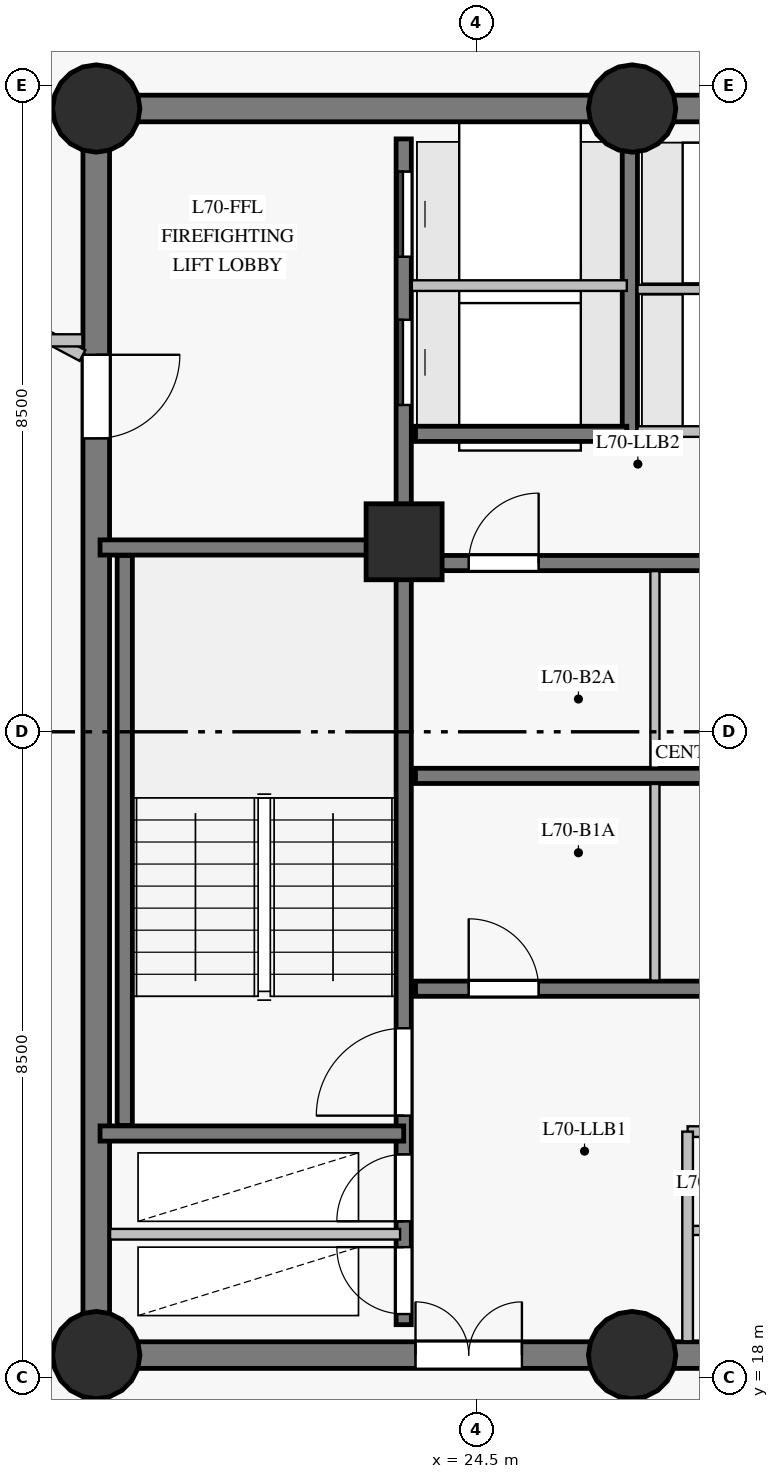
"""IFC4 building model, lengths in metres.
Left out: names, types, materials, properties, quantities, classifications, styles, units other than length and angle.
Written with IfcOpenShell. Run it as: python <this file> out.ifc"""

import sys

from ifc_helpers import new_model, si_unit, direction, frame, frame_2d, origin, origin_with_axes, origin_2d, place, context, subcontext, project, spatial, rectangle, circle, extrude, source, transform, mapped, element, fill, save


model = new_model("IFC4")
c1 = context("Model", 3, precision=1e-05, world=origin(), true_north=direction((0.0, 1.0)))
c2 = subcontext(c1, "Body", "Model", "MODEL_VIEW")
j1 = project(units=[si_unit("LENGTHUNIT", "METRE"), si_unit("PLANEANGLEUNIT", "RADIAN")], contexts=[c1])
p1 = place(None, origin())
s1 = spatial("IfcSite", under=j1, at=p1, CompositionType="ELEMENT")
p2 = place(p1, origin())
s2 = spatial("IfcBuilding", under=s1, at=p2, CompositionType="ELEMENT")
p3 = place(p2, frame((0.0, 0.0, 238.25)))
s3 = spatial("IfcBuildingStorey", under=s2, at=p3, CompositionType="ELEMENT", Elevation=238.25)
p4 = place(p3, frame((19.5, 18.3, 0.0), z_axis=(0.0, 0.0, 1.0), x_axis=(1.0, 0.0, 0.0)))
e1 = element("IfcWall", 1, at=p4, inside=s3, PredefinedType="SHEAR", context=c2, shape_type="SweptSolid", body=[
    extrude(rectangle(XDim=7.05, YDim=0.35, at=frame_2d((3.525, 0.0))), origin(), (0.0, 0.0, 1.0), 2.85),
])
p5 = place(p4, frame((4.2, 0.0, 0.0)))
e2 = element("IfcOpeningElement", 2, at=p5, cuts=e1, PredefinedType="OPENING", context=c2, shape_type="SweptSolid", body=[
    extrude(rectangle(XDim=1.4, YDim=2.2, at=frame_2d((0.7, 1.1))), frame((0.0, 0.185, 0.0), z_axis=(0.0, -1.0, 0.0), x_axis=(1.0, 0.0, 0.0)), (0.0, 0.0, 1.0), 0.37),
])
p6 = place(p3, frame((26.55, 18.3, 0.0), z_axis=(0.0, 0.0, 1.0), x_axis=(1.0, 0.0, 0.0)))
e3 = element("IfcWall", 3, at=p6, inside=s3, PredefinedType="SHEAR", context=c2, shape_type="SweptSolid", body=[
    extrude(rectangle(XDim=10.95, YDim=0.35, at=frame_2d((5.475, 0.0))), origin(), (0.0, 0.0, 1.0), 2.85),
])
p7 = place(p6, frame((4.55, 0.0, 0.0)))
e4 = element("IfcOpeningElement", 4, at=p7, cuts=e3, PredefinedType="OPENING", context=c2, shape_type="SweptSolid", body=[
    extrude(rectangle(XDim=1.4, YDim=2.2, at=frame_2d((0.7, 1.1))), frame((0.0, 0.185, 0.0), z_axis=(0.0, -1.0, 0.0), x_axis=(1.0, 0.0, 0.0)), (0.0, 0.0, 1.0), 0.37),
])
p8 = place(p3, frame((37.5, 34.7, 0.0), z_axis=(0.0, 0.0, 1.0), x_axis=(-1.0, 0.0, 0.0)))
e5 = element("IfcWall", 5, at=p8, inside=s3, PredefinedType="SHEAR", context=c2, shape_type="SweptSolid", body=[
    extrude(rectangle(XDim=10.95, YDim=0.35, at=frame_2d((5.475, 0.0))), origin(), (0.0, 0.0, 1.0), 2.85),
])
p9 = place(p8, frame((2.15, 0.0, 0.0)))
e6 = element("IfcOpeningElement", 6, at=p9, cuts=e5, PredefinedType="OPENING", context=c2, shape_type="SweptSolid", body=[
    extrude(rectangle(XDim=1.2, YDim=2.15, at=frame_2d((0.6, 1.075))), frame((0.0, 0.185, 0.0), z_axis=(0.0, -1.0, 0.0), x_axis=(1.0, 0.0, 0.0)), (0.0, 0.0, 1.0), 0.37),
])
p10 = place(p8, frame((6.35, 0.0, 0.0)))
e7 = element("IfcOpeningElement", 7, at=p10, cuts=e5, PredefinedType="OPENING", context=c2, shape_type="SweptSolid", body=[
    extrude(rectangle(XDim=1.1, YDim=2.15, at=frame_2d((0.55, 1.075))), frame((0.0, 0.185, 0.0), z_axis=(0.0, -1.0, 0.0), x_axis=(1.0, 0.0, 0.0)), (0.0, 0.0, 1.0), 0.37),
])
p11 = place(p3, frame((26.55, 34.7, 0.0), z_axis=(0.0, 0.0, 1.0), x_axis=(-1.0, 0.0, 0.0)))
e8 = element("IfcWall", 8, at=p11, inside=s3, PredefinedType="SHEAR", context=c2, shape_type="SweptSolid", body=[
    extrude(rectangle(XDim=7.05, YDim=0.35, at=frame_2d((3.525, 0.0))), origin(), (0.0, 0.0, 1.0), 2.85),
])
p12 = place(p3, frame((19.5, 34.7, 0.0), z_axis=(0.0, 0.0, 1.0), x_axis=(0.0, -1.0, 0.0)))
e9 = element("IfcWall", 9, at=p12, inside=s3, PredefinedType="SHEAR", context=c2, shape_type="SweptSolid", body=[
    extrude(rectangle(XDim=16.4, YDim=0.35, at=frame_2d((8.2, 0.0))), origin(), (0.0, 0.0, 1.0), 2.85),
])
p13 = place(p12, frame((3.24, 0.0, 0.0)))
e10 = element("IfcOpeningElement", 10, at=p13, cuts=e9, PredefinedType="OPENING", context=c2, shape_type="SweptSolid", body=[
    extrude(rectangle(XDim=1.1, YDim=2.15, at=frame_2d((0.55, 1.075))), frame((0.0, 0.185, 0.0), z_axis=(0.0, -1.0, 0.0), x_axis=(1.0, 0.0, 0.0)), (0.0, 0.0, 1.0), 0.37),
])
m1 = source(origin_with_axes(), c2, "Body", "SweptSolid", [
    extrude(circle(Radius=0.575, at=origin_2d()), origin(), (0.0, 0.0, 1.0), 3.05),
])
for number, where, z_axis, x_axis in (
    (11, (19.5, 18.3, 0.0), (0.0, 0.0, 1.0), (1.0, 0.0, 0.0)),
    (12, (26.55, 18.3, 0.0), (0.0, 0.0, 1.0), (1.0, 0.0, 0.0)),
    (13, (19.5, 34.7, 0.0), (0.0, 0.0, 1.0), (1.0, 0.0, 0.0)),
    (14, (26.55, 34.7, 0.0), (0.0, 0.0, 1.0), (1.0, 0.0, 0.0)),
):
    element("IfcColumn", number, at=place(p3, frame(where, z_axis=z_axis, x_axis=x_axis)), inside=s3, PredefinedType="COLUMN", context=c2, shape_type="MappedRepresentation", body=[
        mapped(m1, transform((0.0, 0.0, 0.0), scale=1.0)),
    ])
m2 = source(origin_with_axes(), c2, "Body", "SweptSolid", [
    extrude(rectangle(XDim=1.0, YDim=1.0, at=origin_2d()), origin(), (0.0, 0.0, 1.0), 3.05),
])
p14 = place(p3, frame((23.55, 29.0, 0.0), z_axis=(0.0, 0.0, 1.0), x_axis=(1.0, 0.0, 0.0)))
e15 = element("IfcColumn", 15, at=p14, inside=s3, PredefinedType="COLUMN", context=c2, shape_type="MappedRepresentation", body=[
    mapped(m2, transform((0.0, 0.0, 0.0), scale=1.0)),
])
p15 = place(p3, frame((23.545, 18.7, 0.0), z_axis=(0.0, 0.0, 1.0), x_axis=(0.0, 1.0, 0.0)))
e16 = element("IfcWall", 16, at=p15, inside=s3, PredefinedType="SHEAR", context=c2, shape_type="SweptSolid", body=[
    extrude(rectangle(XDim=15.6, YDim=0.2, at=frame_2d((7.8, 0.0))), origin(), (0.0, 0.0, 1.0), 2.85),
])
p16 = place(p15, frame((2.75, 0.0, 0.0)))
e17 = element("IfcOpeningElement", 17, at=p16, cuts=e16, PredefinedType="OPENING", context=c2, shape_type="SweptSolid", body=[
    extrude(rectangle(XDim=1.15, YDim=2.15, at=frame_2d((0.575, 1.075))), frame((0.0, 0.11, 0.0), z_axis=(0.0, -1.0, 0.0), x_axis=(1.0, 0.0, 0.0)), (0.0, 0.0, 1.0), 0.22),
])
p17 = place(p15, frame((0.14, 0.0, 0.0)))
e18 = element("IfcOpeningElement", 18, at=p17, cuts=e16, PredefinedType="OPENING", context=c2, shape_type="SweptSolid", body=[
    extrude(rectangle(XDim=0.88, YDim=2.1, at=frame_2d((0.44, 1.05))), frame((0.0, 0.11, 0.0), z_axis=(0.0, -1.0, 0.0), x_axis=(1.0, 0.0, 0.0)), (0.0, 0.0, 1.0), 0.22),
])
p18 = place(p15, frame((1.36, 0.0, 0.0)))
e19 = element("IfcOpeningElement", 19, at=p18, cuts=e16, PredefinedType="OPENING", context=c2, shape_type="SweptSolid", body=[
    extrude(rectangle(XDim=0.88, YDim=2.1, at=frame_2d((0.44, 1.05))), frame((0.0, 0.11, 0.0), z_axis=(0.0, -1.0, 0.0), x_axis=(1.0, 0.0, 0.0)), (0.0, 0.0, 1.0), 0.22),
])
p19 = place(p15, frame((12.1, 0.0, 0.0)))
e20 = element("IfcOpeningElement", 20, at=p19, cuts=e16, PredefinedType="OPENING", context=c2, shape_type="SweptSolid", body=[
    extrude(rectangle(XDim=1.12, YDim=2.15, at=frame_2d((0.56, 1.075))), frame((0.0, 0.11, 0.0), z_axis=(0.0, -1.0, 0.0), x_axis=(1.0, 0.0, 0.0)), (0.0, 0.0, 1.0), 0.22),
])
p20 = place(p15, frame((14.05, 0.0, 0.0)))
e21 = element("IfcOpeningElement", 21, at=p20, cuts=e16, PredefinedType="OPENING", context=c2, shape_type="SweptSolid", body=[
    extrude(rectangle(XDim=1.12, YDim=2.15, at=frame_2d((0.56, 1.075))), frame((0.0, 0.11, 0.0), z_axis=(0.0, -1.0, 0.0), x_axis=(1.0, 0.0, 0.0)), (0.0, 0.0, 1.0), 0.22),
])
p21 = place(p3, frame((23.7, 23.12, 0.0), z_axis=(0.0, 0.0, 1.0), x_axis=(1.0, 0.0, 0.0)))
e22 = element("IfcWall", 22, at=p21, inside=s3, PredefinedType="SHEAR", context=c2, shape_type="SweptSolid", body=[
    extrude(rectangle(XDim=9.6, YDim=0.2, at=frame_2d((4.8, 0.0))), origin(), (0.0, 0.0, 1.0), 2.85),
])
p22 = place(p21, frame((0.7, 0.0, 0.0)))
e23 = element("IfcOpeningElement", 23, at=p22, cuts=e22, PredefinedType="OPENING", context=c2, shape_type="SweptSolid", body=[
    extrude(rectangle(XDim=0.92, YDim=2.1, at=frame_2d((0.46, 1.05))), frame((0.0, 0.11, 0.0), z_axis=(0.0, -1.0, 0.0), x_axis=(1.0, 0.0, 0.0)), (0.0, 0.0, 1.0), 0.22),
])
p23 = place(p21, frame((4.2, 0.0, 0.0)))
e24 = element("IfcOpeningElement", 24, at=p23, cuts=e22, PredefinedType="OPENING", context=c2, shape_type="SweptSolid", body=[
    extrude(rectangle(XDim=0.92, YDim=2.1, at=frame_2d((0.46, 1.05))), frame((0.0, 0.11, 0.0), z_axis=(0.0, -1.0, 0.0), x_axis=(1.0, 0.0, 0.0)), (0.0, 0.0, 1.0), 0.22),
])
p24 = place(p21, frame((7.45, 0.0, 0.0)))
e25 = element("IfcOpeningElement", 25, at=p24, cuts=e22, PredefinedType="OPENING", context=c2, shape_type="SweptSolid", body=[
    extrude(rectangle(XDim=0.92, YDim=2.1, at=frame_2d((0.46, 1.05))), frame((0.0, 0.11, 0.0), z_axis=(0.0, -1.0, 0.0), x_axis=(1.0, 0.0, 0.0)), (0.0, 0.0, 1.0), 0.22),
])
p25 = place(p3, frame((23.7, 25.92, 0.0), z_axis=(0.0, 0.0, 1.0), x_axis=(1.0, 0.0, 0.0)))
e26 = element("IfcWall", 26, at=p25, inside=s3, PredefinedType="SHEAR", context=c2, shape_type="SweptSolid", body=[
    extrude(rectangle(XDim=9.6, YDim=0.2, at=frame_2d((4.8, 0.0))), origin(), (0.0, 0.0, 1.0), 2.85),
])
p26 = place(p3, frame((23.7, 28.72, 0.0), z_axis=(0.0, 0.0, 1.0), x_axis=(1.0, 0.0, 0.0)))
e27 = element("IfcWall", 27, at=p26, inside=s3, PredefinedType="SHEAR", context=c2, shape_type="SweptSolid", body=[
    extrude(rectangle(XDim=9.6, YDim=0.2, at=frame_2d((4.8, 0.0))), origin(), (0.0, 0.0, 1.0), 2.85),
])
p27 = place(p26, frame((0.7, 0.0, 0.0)))
e28 = element("IfcOpeningElement", 28, at=p27, cuts=e27, PredefinedType="OPENING", context=c2, shape_type="SweptSolid", body=[
    extrude(rectangle(XDim=0.92, YDim=2.1, at=frame_2d((0.46, 1.05))), frame((0.0, 0.11, 0.0), z_axis=(0.0, -1.0, 0.0), x_axis=(1.0, 0.0, 0.0)), (0.0, 0.0, 1.0), 0.22),
])
p28 = place(p26, frame((4.2, 0.0, 0.0)))
e29 = element("IfcOpeningElement", 29, at=p28, cuts=e27, PredefinedType="OPENING", context=c2, shape_type="SweptSolid", body=[
    extrude(rectangle(XDim=0.92, YDim=2.1, at=frame_2d((0.46, 1.05))), frame((0.0, 0.11, 0.0), z_axis=(0.0, -1.0, 0.0), x_axis=(1.0, 0.0, 0.0)), (0.0, 0.0, 1.0), 0.22),
])
p29 = place(p26, frame((7.45, 0.0, 0.0)))
e30 = element("IfcOpeningElement", 30, at=p29, cuts=e27, PredefinedType="OPENING", context=c2, shape_type="SweptSolid", body=[
    extrude(rectangle(XDim=0.92, YDim=2.1, at=frame_2d((0.46, 1.05))), frame((0.0, 0.11, 0.0), z_axis=(0.0, -1.0, 0.0), x_axis=(1.0, 0.0, 0.0)), (0.0, 0.0, 1.0), 0.22),
])
p30 = place(p3, frame((19.875, 21.32, 0.0), z_axis=(0.0, 0.0, 1.0), x_axis=(0.0, 1.0, 0.0)))
e31 = element("IfcWall", 31, at=p30, inside=s3, PredefinedType="SHEAR", context=c2, shape_type="SweptSolid", body=[
    extrude(rectangle(XDim=7.5, YDim=0.2, at=frame_2d((3.75, 0.0))), origin(), (0.0, 0.0, 1.0), 2.85),
])
for number, where, z_axis, x_axis in (
    (32, (19.55, 21.215, 0.0), (0.0, 0.0, 1.0), (1.0, 0.0, 0.0)),
    (33, (19.55, 28.925, 0.0), (0.0, 0.0, 1.0), (1.0, 0.0, 0.0)),
):
    element("IfcWall", number, at=place(p3, frame(where, z_axis=z_axis, x_axis=x_axis)), inside=s3, PredefinedType="SHEAR", context=c2, shape_type="SweptSolid", body=[
        extrude(rectangle(XDim=3.995, YDim=0.2, at=frame_2d((1.998, 0.0))), origin(), (0.0, 0.0, 1.0), 2.85),
    ])
p31 = place(p3, frame((26.52, 30.42, 0.0), z_axis=(0.0, 0.0, 1.0), x_axis=(0.0, 1.0, 0.0)))
e34 = element("IfcWall", 34, at=p31, inside=s3, PredefinedType="SHEAR", context=c2, shape_type="SweptSolid", body=[
    extrude(rectangle(XDim=3.86, YDim=0.2, at=frame_2d((1.93, 0.0))), origin(), (0.0, 0.0, 1.0), 2.85),
])
p32 = place(p3, frame((23.7, 30.42, 0.0), z_axis=(0.0, 0.0, 1.0), x_axis=(1.0, 0.0, 0.0)))
e35 = element("IfcWall", 35, at=p32, inside=s3, PredefinedType="SHEAR", context=c2, shape_type="SweptSolid", body=[
    extrude(rectangle(XDim=2.78, YDim=0.2, at=frame_2d((1.39, 0.0))), origin(), (0.0, 0.0, 1.0), 2.85),
])
p33 = place(p3, frame((19.319, 31.45, 0.0), z_axis=(0.0, 0.0, 1.0), x_axis=(-0.882947778203, 0.469471214203, 0.0)))
e36 = element("IfcWall", 36, at=p33, inside=s3, PredefinedType="PARTITIONING", context=c2, shape_type="SweptSolid", body=[
    extrude(rectangle(XDim=9.226, YDim=0.16, at=frame_2d((4.613, 0.0))), origin(), (0.0, 0.0, 1.0), 2.85),
])
p34 = place(p3, frame((19.682, 19.89, 0.0), z_axis=(0.0, 0.0, 1.0), x_axis=(1.0, 0.0, 0.0)))
e37 = element("IfcWall", 37, at=p34, inside=s3, PredefinedType="PARTITIONING", context=c2, shape_type="SweptSolid", body=[
    extrude(rectangle(XDim=3.815, YDim=0.14, at=frame_2d((1.908, 0.0))), origin(), (0.0, 0.0, 1.0), 2.85),
])
p35 = place(p3, frame((27.28, 21.24, 0.0), z_axis=(0.0, 0.0, 1.0), x_axis=(1.0, 0.0, 0.0)))
e38 = element("IfcWall", 38, at=p35, inside=s3, PredefinedType="PARTITIONING", context=c2, shape_type="SweptSolid", body=[
    extrude(rectangle(XDim=3.44, YDim=0.14, at=frame_2d((1.72, 0.0))), origin(), (0.0, 0.0, 1.0), 2.85),
])
p36 = place(p35, frame((1.15, 0.0, 0.0)))
e39 = element("IfcOpeningElement", 39, at=p36, cuts=e38, PredefinedType="OPENING", context=c2, shape_type="SweptSolid", body=[
    extrude(rectangle(XDim=0.92, YDim=2.1, at=frame_2d((0.46, 1.05))), frame((0.0, 0.08, 0.0), z_axis=(0.0, -1.0, 0.0), x_axis=(1.0, 0.0, 0.0)), (0.0, 0.0, 1.0), 0.16),
])
p37 = place(p3, frame((27.28, 19.94, 0.0), z_axis=(0.0, 0.0, 1.0), x_axis=(1.0, 0.0, 0.0)))
e40 = element("IfcWall", 40, at=p37, inside=s3, PredefinedType="PARTITIONING", context=c2, shape_type="SweptSolid", body=[
    extrude(rectangle(XDim=3.44, YDim=0.12, at=frame_2d((1.72, 0.0))), origin(), (0.0, 0.0, 1.0), 2.85),
])
p38 = place(p3, frame((23.652, 32.37, 0.0), z_axis=(0.0, 0.0, 1.0), x_axis=(1.0, 0.0, 0.0)))
e41 = element("IfcWall", 41, at=p38, inside=s3, PredefinedType="PARTITIONING", context=c2, shape_type="SweptSolid", body=[
    extrude(rectangle(XDim=2.828, YDim=0.14, at=frame_2d((1.414, 0.0))), origin(), (0.0, 0.0, 1.0), 2.85),
])
p39 = place(p3, frame((27.28, 18.482, 0.0), z_axis=(0.0, 0.0, 1.0), x_axis=(0.0, 1.0, 0.0)))
e42 = element("IfcWall", 42, at=p39, inside=s3, PredefinedType="PARTITIONING", context=c2, shape_type="SweptSolid", body=[
    extrude(rectangle(XDim=2.758, YDim=0.14, at=frame_2d((1.379, 0.0))), origin(), (0.0, 0.0, 1.0), 2.85),
])
p40 = place(p3, frame((26.62, 30.45, 0.0), z_axis=(0.0, 0.0, 1.0), x_axis=(1.0, 0.0, 0.0)))
e43 = element("IfcWall", 43, at=p40, inside=s3, PredefinedType="PARTITIONING", context=c2, shape_type="SweptSolid", body=[
    extrude(rectangle(XDim=2.58, YDim=0.14, at=frame_2d((1.29, 0.0))), origin(), (0.0, 0.0, 1.0), 2.85),
])
p41 = place(p3, frame((26.62, 32.32, 0.0), z_axis=(0.0, 0.0, 1.0), x_axis=(1.0, 0.0, 0.0)))
e44 = element("IfcWall", 44, at=p41, inside=s3, PredefinedType="PARTITIONING", context=c2, shape_type="SweptSolid", body=[
    extrude(rectangle(XDim=2.58, YDim=0.12, at=frame_2d((1.29, 0.0))), origin(), (0.0, 0.0, 1.0), 2.85),
])
p42 = place(p3, frame((16.75, 31.65, 0.0), z_axis=(0.0, 0.0, 1.0), x_axis=(1.0, 0.0, 0.0)))
e45 = element("IfcWall", 45, at=p42, inside=s3, PredefinedType="PARTITIONING", context=c2, shape_type="SweptSolid", body=[
    extrude(rectangle(XDim=2.568, YDim=0.16, at=frame_2d((1.284, 0.0))), origin(), (0.0, 0.0, 1.0), 2.85),
])
for number, where, z_axis, x_axis in (
    (46, (26.85, 23.227, 0.0), (0.0, 0.0, 1.0), (0.0, 1.0, 0.0)),
    (47, (26.85, 26.027, 0.0), (0.0, 0.0, 1.0), (0.0, 1.0, 0.0)),
):
    element("IfcWall", number, at=place(p3, frame(where, z_axis=z_axis, x_axis=x_axis)), inside=s3, PredefinedType="PARTITIONING", context=c2, shape_type="SweptSolid", body=[
        extrude(rectangle(XDim=2.587, YDim=0.12, at=frame_2d((1.293, 0.0))), origin(), (0.0, 0.0, 1.0), 2.85),
    ])
m3 = source(origin_with_axes(), c2, "Body", "SweptSolid", [
    extrude(rectangle(XDim=1.15, YDim=2.15, at=frame_2d((0.575, 1.075))), frame((0.0, 0.025, 0.0), z_axis=(0.0, -1.0, 0.0), x_axis=(1.0, 0.0, 0.0)), (0.0, 0.0, 1.0), 0.05),
])
p43 = place(p16, origin())
e48 = element("IfcDoor", 48, at=p43, inside=s3, OperationType="SINGLE_SWING_LEFT", PredefinedType="DOOR", context=c2, shape_type="MappedRepresentation", body=[
    mapped(m3, transform((0.0, 0.0, 0.0), scale=1.0)),
])
fill(e17, e48)
m4 = source(origin_with_axes(), c2, "Body", "SweptSolid", [
    extrude(rectangle(XDim=1.1, YDim=2.15, at=frame_2d((0.55, 1.075))), frame((0.0, 0.025, 0.0), z_axis=(0.0, -1.0, 0.0), x_axis=(1.0, 0.0, 0.0)), (0.0, 0.0, 1.0), 0.05),
])
p44 = place(p13, origin())
e49 = element("IfcDoor", 49, at=p44, inside=s3, OperationType="SINGLE_SWING_LEFT", PredefinedType="DOOR", context=c2, shape_type="MappedRepresentation", body=[
    mapped(m4, transform((0.0, 0.0, 0.0), scale=1.0)),
])
fill(e10, e49)
m5 = source(origin_with_axes(), c2, "Body", "SweptSolid", [
    extrude(rectangle(XDim=0.88, YDim=2.1, at=frame_2d((0.44, 1.05))), frame((0.0, 0.025, 0.0), z_axis=(0.0, -1.0, 0.0), x_axis=(1.0, 0.0, 0.0)), (0.0, 0.0, 1.0), 0.05),
])
p45 = place(p17, origin())
e50 = element("IfcDoor", 50, at=p45, inside=s3, OperationType="SINGLE_SWING_RIGHT", PredefinedType="DOOR", context=c2, shape_type="MappedRepresentation", body=[
    mapped(m5, transform((0.0, 0.0, 0.0), scale=1.0)),
])
fill(e18, e50)
p46 = place(p18, origin())
e51 = element("IfcDoor", 51, at=p46, inside=s3, OperationType="SINGLE_SWING_LEFT", PredefinedType="DOOR", context=c2, shape_type="MappedRepresentation", body=[
    mapped(m5, transform((0.0, 0.0, 0.0), scale=1.0)),
])
fill(e19, e51)
m6 = source(origin_with_axes(), c2, "Body", "SweptSolid", [
    extrude(rectangle(XDim=1.4, YDim=2.2, at=frame_2d((0.7, 1.1))), frame((0.0, 0.025, 0.0), z_axis=(0.0, -1.0, 0.0), x_axis=(1.0, 0.0, 0.0)), (0.0, 0.0, 1.0), 0.05),
])
p47 = place(p5, origin())
e52 = element("IfcDoor", 52, at=p47, inside=s3, OperationType="DOUBLE_DOOR_SINGLE_SWING", PredefinedType="DOOR", context=c2, shape_type="MappedRepresentation", body=[
    mapped(m6, transform((0.0, 0.0, 0.0), scale=1.0)),
])
fill(e2, e52)
m7 = source(origin_with_axes(), c2, "Body", "SweptSolid", [
    extrude(rectangle(XDim=0.92, YDim=2.1, at=frame_2d((0.46, 1.05))), frame((0.0, 0.025, 0.0), z_axis=(0.0, -1.0, 0.0), x_axis=(1.0, 0.0, 0.0)), (0.0, 0.0, 1.0), 0.05),
])
p48 = place(p22, origin())
e53 = element("IfcDoor", 53, at=p48, inside=s3, OperationType="SINGLE_SWING_LEFT", PredefinedType="DOOR", context=c2, shape_type="MappedRepresentation", body=[
    mapped(m7, transform((0.0, 0.0, 0.0), scale=1.0)),
])
fill(e23, e53)
p49 = place(p27, origin())
e54 = element("IfcDoor", 54, at=p49, inside=s3, OperationType="SINGLE_SWING_RIGHT", PredefinedType="DOOR", context=c2, shape_type="MappedRepresentation", body=[
    mapped(m7, transform((0.0, 0.0, 0.0), scale=1.0)),
])
fill(e28, e54)
m8 = source(origin_with_axes(), c2, "Body", "SweptSolid", [
    extrude(rectangle(XDim=1.12, YDim=2.15, at=frame_2d((0.56, 1.075))), frame((0.0, 0.025, 0.0), z_axis=(0.0, -1.0, 0.0), x_axis=(1.0, 0.0, 0.0)), (0.0, 0.0, 1.0), 0.05),
])
p50 = place(p19, origin())
e55 = element("IfcDoor", 55, at=p50, inside=s3, OperationType="SLIDING_TO_LEFT", PredefinedType="DOOR", context=c2, shape_type="MappedRepresentation", body=[
    mapped(m8, transform((0.0, 0.0, 0.0), scale=1.0)),
])
fill(e20, e55)
p51 = place(p20, origin())
e56 = element("IfcDoor", 56, at=p51, inside=s3, OperationType="SLIDING_TO_RIGHT", PredefinedType="DOOR", context=c2, shape_type="MappedRepresentation", body=[
    mapped(m8, transform((0.0, 0.0, 0.0), scale=1.0)),
])
fill(e21, e56)
save(model, sys.argv[1])
